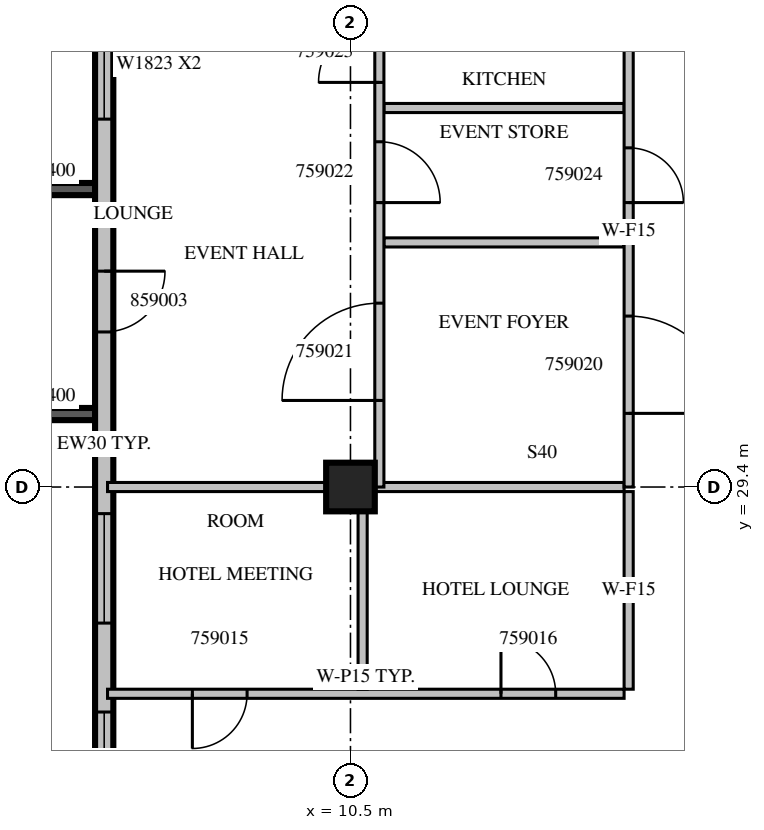
"""IFC4 building model, lengths in metres.
Left out: names, types, materials, properties, quantities, classifications, styles, units other than length and angle.
Written with IfcOpenShell. Run it as: python <this file> out.ifc"""

import sys

from ifc_helpers import new_model, si_unit, direction, frame, frame_2d, origin, origin_2d, place, context, subcontext, project, spatial, rectangle, extrude, source, transform, mapped, element, fill, save


model = new_model("IFC4")
c1 = context("Model", 3, precision=1e-05, world=origin(), true_north=direction((0.0, 1.0)))
c2 = subcontext(c1, "Body", "Model", "MODEL_VIEW")
j1 = project(units=[si_unit("LENGTHUNIT", "METRE"), si_unit("PLANEANGLEUNIT", "RADIAN")], contexts=[c1])
p1 = place(None, origin())
s1 = spatial("IfcSite", under=j1, at=p1, CompositionType="ELEMENT")
p2 = place(p1, origin())
s2 = spatial("IfcBuilding", under=s1, at=p2, CompositionType="ELEMENT")
p3 = place(p2, frame((0.0, 0.0, 257.6)))
s3 = spatial("IfcBuildingStorey", under=s2, at=p3, CompositionType="ELEMENT", Elevation=257.6)
m1 = source(origin(), c2, "Body", "SweptSolid", [
    extrude(rectangle(XDim=0.8, YDim=0.8, at=origin_2d()), origin(), (0.0, 0.0, 1.0), 3.8),
])
p4 = place(p3, frame((10.5, 29.4, 0.0), z_axis=(0.0, 0.0, 1.0), x_axis=(1.0, 0.0, 0.0)))
e1 = element("IfcColumn", 1, at=p4, inside=s3, PredefinedType="COLUMN", context=c2, shape_type="MappedRepresentation", body=[
    mapped(m1, transform((0.0, 0.0, 0.0), scale=1.0)),
])
m2 = source(origin(), c2, "Body", "SweptSolid", [
    extrude(rectangle(XDim=2.1, YDim=0.2, at=frame_2d((1.05, 0.0))), origin(), (0.0, 0.0, 1.0), 3.4),
])
for number, where, z_axis, x_axis in (
    (2, (6.3, 34.3, 0.0), (0.0, 0.0, 1.0), (-1.0, 0.0, 0.0)),
    (3, (6.3, 30.6, 0.0), (0.0, 0.0, 1.0), (-1.0, 0.0, 0.0)),
):
    element("IfcWall", number, at=place(p3, frame(where, z_axis=z_axis, x_axis=x_axis)), inside=s3, PredefinedType="SOLIDWALL", context=c2, shape_type="MappedRepresentation", body=[
        mapped(m2, transform((0.0, 0.0, 0.0), scale=1.0)),
    ])
m3 = source(origin(), c2, "Body", "SweptSolid", [
    extrude(rectangle(XDim=16.6, YDim=0.3, at=frame_2d((8.3, 0.0))), origin(), (0.0, 0.0, 1.0), 3.4),
])
p5 = place(p3, frame((6.45, 38.4, 0.0), z_axis=(0.0, 0.0, 1.0), x_axis=(0.0, -1.0, 0.0)))
e4 = element("IfcWall", 4, at=p5, inside=s3, PredefinedType="STANDARD", context=c2, shape_type="MappedRepresentation", body=[
    mapped(m3, transform((0.0, 0.0, 0.0), scale=1.0)),
])
m4 = source(origin(), c2, "Body", "SweptSolid", [
    extrude(rectangle(XDim=1.8, YDim=2.3, at=frame_2d((0.9, 1.15))), frame((0.0, 0.16, 0.0), z_axis=(0.0, -1.0, 0.0), x_axis=(1.0, 0.0, 0.0)), (0.0, 0.0, 1.0), 0.32),
])
p6 = place(p5, frame((1.15, 0.0, 0.6)))
e5 = element("IfcOpeningElement", 5, at=p6, cuts=e4, PredefinedType="OPENING", context=c2, shape_type="MappedRepresentation", body=[
    mapped(m4, transform((0.0, 0.0, 0.0), scale=1.0)),
])
p7 = place(p5, frame((9.438, 0.0, 0.6)))
e6 = element("IfcOpeningElement", 6, at=p7, cuts=e4, PredefinedType="OPENING", context=c2, shape_type="MappedRepresentation", body=[
    mapped(m4, transform((0.0, 0.0, 0.0), scale=1.0)),
])
m5 = source(origin(), c2, "Body", "SweptSolid", [
    extrude(rectangle(XDim=3.0, YDim=2.3, at=frame_2d((1.5, 1.15))), frame((0.0, 0.16, 0.0), z_axis=(0.0, -1.0, 0.0), x_axis=(1.0, 0.0, 0.0)), (0.0, 0.0, 1.0), 0.32),
])
p8 = place(p5, frame((12.7, 0.0, 0.6)))
e7 = element("IfcOpeningElement", 7, at=p8, cuts=e4, PredefinedType="OPENING", context=c2, shape_type="MappedRepresentation", body=[
    mapped(m5, transform((0.0, 0.0, 0.0), scale=1.0)),
])
m6 = source(origin(), c2, "Body", "SweptSolid", [
    extrude(rectangle(XDim=1.0, YDim=2.1, at=frame_2d((0.5, 1.05))), frame((0.0, 0.16, 0.0), z_axis=(0.0, -1.0, 0.0), x_axis=(1.0, 0.0, 0.0)), (0.0, 0.0, 1.0), 0.32),
])
p9 = place(p5, frame((5.45, 0.0, 0.0)))
e8 = element("IfcOpeningElement", 8, at=p9, cuts=e4, PredefinedType="OPENING", context=c2, shape_type="MappedRepresentation", body=[
    mapped(m6, transform((0.0, 0.0, 0.0), scale=1.0)),
])
m7 = source(origin(), c2, "Body", "SweptSolid", [
    extrude(rectangle(XDim=8.495, YDim=0.15, at=frame_2d((4.247, 0.0))), origin(), (0.0, 0.0, 1.0), 3.4),
])
p10 = place(p3, frame((6.505, 26.0, 0.0), z_axis=(0.0, 0.0, 1.0), x_axis=(1.0, 0.0, 0.0)))
e9 = element("IfcWall", 9, at=p10, inside=s3, PredefinedType="PARTITIONING", context=c2, shape_type="MappedRepresentation", body=[
    mapped(m7, transform((0.0, 0.0, 0.0), scale=1.0)),
])
m8 = source(origin(), c2, "Body", "SweptSolid", [
    extrude(rectangle(XDim=0.9, YDim=2.1, at=frame_2d((0.45, 1.05))), frame((0.0, 0.085, 0.0), z_axis=(0.0, -1.0, 0.0), x_axis=(1.0, 0.0, 0.0)), (0.0, 0.0, 1.0), 0.17),
])
p11 = place(p10, frame((1.395, 0.0, 0.0)))
e10 = element("IfcOpeningElement", 10, at=p11, cuts=e9, PredefinedType="OPENING", context=c2, shape_type="MappedRepresentation", body=[
    mapped(m8, transform((0.0, 0.0, 0.0), scale=1.0)),
])
p12 = place(p10, frame((6.47, 0.0, 0.0)))
e11 = element("IfcOpeningElement", 11, at=p12, cuts=e9, PredefinedType="OPENING", context=c2, shape_type="MappedRepresentation", body=[
    mapped(m8, transform((0.0, 0.0, 0.0), scale=1.0)),
])
p13 = place(p3, frame((10.7, 26.075, 0.0), z_axis=(0.0, 0.0, 1.0), x_axis=(0.0, 1.0, 0.0)))
e12 = element("IfcWall", 12, at=p13, inside=s3, PredefinedType="PARTITIONING", context=c2, shape_type="SweptSolid", body=[
    extrude(rectangle(XDim=2.926, YDim=0.15, at=frame_2d((1.463, 0.0))), origin(), (0.0, 0.0, 1.0), 3.4),
])
m9 = source(origin(), c2, "Body", "SweptSolid", [
    extrude(rectangle(XDim=3.25, YDim=0.15, at=frame_2d((1.625, 0.0))), origin(), (0.0, 0.0, 1.0), 3.4),
])
p14 = place(p3, frame((15.075, 26.075, 0.0), z_axis=(0.0, 0.0, 1.0), x_axis=(0.0, 1.0, 0.0)))
e13 = element("IfcWall", 13, at=p14, inside=s3, PredefinedType="PARTITIONING", context=c2, shape_type="MappedRepresentation", body=[
    mapped(m9, transform((0.0, 0.0, 0.0), scale=1.0)),
])
m10 = source(origin(), c2, "Body", "SweptSolid", [
    extrude(rectangle(XDim=3.596, YDim=0.15, at=frame_2d((1.798, 0.0))), origin(), (0.0, 0.0, 1.0), 3.4),
])
p15 = place(p3, frame((10.101, 29.4, 0.0), z_axis=(0.0, 0.0, 1.0), x_axis=(-1.0, 0.0, 0.0)))
e14 = element("IfcWall", 14, at=p15, inside=s3, PredefinedType="PARTITIONING", context=c2, shape_type="MappedRepresentation", body=[
    mapped(m10, transform((0.0, 0.0, 0.0), scale=1.0)),
])
m11 = source(origin(), c2, "Body", "SweptSolid", [
    extrude(rectangle(XDim=4.101, YDim=0.15, at=frame_2d((2.05, 0.0))), origin(), (0.0, 0.0, 1.0), 3.4),
])
p16 = place(p3, frame((15.0, 29.4, 0.0), z_axis=(0.0, 0.0, 1.0), x_axis=(-1.0, 0.0, 0.0)))
e15 = element("IfcWall", 15, at=p16, inside=s3, PredefinedType="PARTITIONING", context=c2, shape_type="MappedRepresentation", body=[
    mapped(m11, transform((0.0, 0.0, 0.0), scale=1.0)),
])
m12 = source(origin(), c2, "Body", "SweptSolid", [
    extrude(rectangle(XDim=3.95, YDim=0.15, at=frame_2d((1.975, 0.0))), origin(), (0.0, 0.0, 1.0), 3.4),
])
for number, where, z_axis, x_axis in (
    (16, (15.0, 33.422, 0.0), (0.0, 0.0, 1.0), (-1.0, 0.0, 0.0)),
    (17, (15.0, 35.633, 0.0), (0.0, 0.0, 1.0), (-1.0, 0.0, 0.0)),
):
    element("IfcWall", number, at=place(p3, frame(where, z_axis=z_axis, x_axis=x_axis)), inside=s3, PredefinedType="PARTITIONING", context=c2, shape_type="MappedRepresentation", body=[
        mapped(m12, transform((0.0, 0.0, 0.0), scale=1.0)),
    ])
m13 = source(origin(), c2, "Body", "SweptSolid", [
    extrude(rectangle(XDim=8.4, YDim=0.15, at=frame_2d((4.2, 0.0))), origin(), (0.0, 0.0, 1.0), 3.4),
])
p17 = place(p3, frame((10.975, 29.4, 0.0), z_axis=(0.0, 0.0, 1.0), x_axis=(0.0, 1.0, 0.0)))
e18 = element("IfcWall", 18, at=p17, inside=s3, PredefinedType="PARTITIONING", context=c2, shape_type="MappedRepresentation", body=[
    mapped(m13, transform((0.0, 0.0, 0.0), scale=1.0)),
])
m14 = source(origin(), c2, "Body", "SweptSolid", [
    extrude(rectangle(XDim=1.6, YDim=2.1, at=frame_2d((0.8, 1.05))), frame((0.0, 0.085, 0.0), z_axis=(0.0, -1.0, 0.0), x_axis=(1.0, 0.0, 0.0)), (0.0, 0.0, 1.0), 0.17),
])
p18 = place(p17, frame((1.424, 0.0, 0.0)))
e19 = element("IfcOpeningElement", 19, at=p18, cuts=e18, PredefinedType="OPENING", context=c2, shape_type="MappedRepresentation", body=[
    mapped(m14, transform((0.0, 0.0, 0.0), scale=1.0)),
])
m15 = source(origin(), c2, "Body", "SweptSolid", [
    extrude(rectangle(XDim=1.0, YDim=2.1, at=frame_2d((0.5, 1.05))), frame((0.0, 0.085, 0.0), z_axis=(0.0, -1.0, 0.0), x_axis=(1.0, 0.0, 0.0)), (0.0, 0.0, 1.0), 0.17),
])
p19 = place(p17, frame((4.678, 0.0, 0.0)))
e20 = element("IfcOpeningElement", 20, at=p19, cuts=e18, PredefinedType="OPENING", context=c2, shape_type="MappedRepresentation", body=[
    mapped(m15, transform((0.0, 0.0, 0.0), scale=1.0)),
])
p20 = place(p17, frame((6.654, 0.0, 0.0)))
e21 = element("IfcOpeningElement", 21, at=p20, cuts=e18, PredefinedType="OPENING", context=c2, shape_type="MappedRepresentation", body=[
    mapped(m15, transform((0.0, 0.0, 0.0), scale=1.0)),
])
p21 = place(p3, frame((15.075, 29.4, 0.0), z_axis=(0.0, 0.0, 1.0), x_axis=(0.0, 1.0, 0.0)))
e22 = element("IfcWall", 22, at=p21, inside=s3, PredefinedType="PARTITIONING", context=c2, shape_type="MappedRepresentation", body=[
    mapped(m13, transform((0.0, 0.0, 0.0), scale=1.0)),
])
p22 = place(p21, frame((1.211, 0.0, 0.0)))
e23 = element("IfcOpeningElement", 23, at=p22, cuts=e22, PredefinedType="OPENING", context=c2, shape_type="MappedRepresentation", body=[
    mapped(m14, transform((0.0, 0.0, 0.0), scale=1.0)),
])
p23 = place(p21, frame((4.678, 0.0, 0.0)))
e24 = element("IfcOpeningElement", 24, at=p23, cuts=e22, PredefinedType="OPENING", context=c2, shape_type="MappedRepresentation", body=[
    mapped(m8, transform((0.0, 0.0, 0.0), scale=1.0)),
])
m16 = source(origin(), c2, "Body", "SweptSolid", [
    extrude(rectangle(XDim=1.8, YDim=2.3, at=frame_2d((0.9, 1.15))), frame((0.0, 0.03, 0.0), z_axis=(0.0, -1.0, 0.0), x_axis=(1.0, 0.0, 0.0)), (0.0, 0.0, 1.0), 0.06),
])
p24 = place(p6, origin())
e25 = element("IfcWindow", 25, at=p24, inside=s3, PartitioningType="SINGLE_PANEL", PredefinedType="WINDOW", context=c2, shape_type="MappedRepresentation", body=[
    mapped(m16, transform((0.0, 0.0, 0.0), scale=1.0)),
])
fill(e5, e25)
p25 = place(p7, origin())
e26 = element("IfcWindow", 26, at=p25, inside=s3, PartitioningType="SINGLE_PANEL", PredefinedType="WINDOW", context=c2, shape_type="MappedRepresentation", body=[
    mapped(m16, transform((0.0, 0.0, 0.0), scale=1.0)),
])
fill(e6, e26)
m17 = source(origin(), c2, "Body", "SweptSolid", [
    extrude(rectangle(XDim=3.0, YDim=2.3, at=frame_2d((1.5, 1.15))), frame((0.0, 0.03, 0.0), z_axis=(0.0, -1.0, 0.0), x_axis=(1.0, 0.0, 0.0)), (0.0, 0.0, 1.0), 0.06),
])
p26 = place(p8, origin())
e27 = element("IfcWindow", 27, at=p26, inside=s3, PartitioningType="SINGLE_PANEL", PredefinedType="WINDOW", context=c2, shape_type="MappedRepresentation", body=[
    mapped(m17, transform((0.0, 0.0, 0.0), scale=1.0)),
])
fill(e7, e27)
m18 = source(origin(), c2, "Body", "SweptSolid", [
    extrude(rectangle(XDim=0.9, YDim=2.1, at=frame_2d((0.45, 1.05))), frame((0.0, 0.025, 0.0), z_axis=(0.0, -1.0, 0.0), x_axis=(1.0, 0.0, 0.0)), (0.0, 0.0, 1.0), 0.05),
])
p27 = place(p11, origin())
e28 = element("IfcDoor", 28, at=p27, inside=s3, OperationType="SINGLE_SWING_RIGHT", PredefinedType="DOOR", context=c2, shape_type="MappedRepresentation", body=[
    mapped(m18, transform((0.0, 0.0, 0.0), scale=1.0)),
])
fill(e10, e28)
p28 = place(p12, origin())
e29 = element("IfcDoor", 29, at=p28, inside=s3, OperationType="SINGLE_SWING_LEFT", PredefinedType="DOOR", context=c2, shape_type="MappedRepresentation", body=[
    mapped(m18, transform((0.0, 0.0, 0.0), scale=1.0)),
])
fill(e11, e29)
m19 = source(origin(), c2, "Body", "SweptSolid", [
    extrude(rectangle(XDim=1.6, YDim=2.1, at=frame_2d((0.8, 1.05))), frame((0.0, 0.025, 0.0), z_axis=(0.0, -1.0, 0.0), x_axis=(1.0, 0.0, 0.0)), (0.0, 0.0, 1.0), 0.05),
])
p29 = place(p22, origin())
e30 = element("IfcDoor", 30, at=p29, inside=s3, OperationType="SINGLE_SWING_RIGHT", PredefinedType="DOOR", context=c2, shape_type="MappedRepresentation", body=[
    mapped(m19, transform((0.0, 0.0, 0.0), scale=1.0)),
])
fill(e23, e30)
p30 = place(p18, origin())
e31 = element("IfcDoor", 31, at=p30, inside=s3, OperationType="SINGLE_SWING_LEFT", PredefinedType="DOOR", context=c2, shape_type="MappedRepresentation", body=[
    mapped(m19, transform((0.0, 0.0, 0.0), scale=1.0)),
])
fill(e19, e31)
m20 = source(origin(), c2, "Body", "SweptSolid", [
    extrude(rectangle(XDim=1.0, YDim=2.1, at=frame_2d((0.5, 1.05))), frame((0.0, 0.025, 0.0), z_axis=(0.0, -1.0, 0.0), x_axis=(1.0, 0.0, 0.0)), (0.0, 0.0, 1.0), 0.05),
])
p31 = place(p19, origin())
e32 = element("IfcDoor", 32, at=p31, inside=s3, OperationType="SINGLE_SWING_RIGHT", PredefinedType="DOOR", context=c2, shape_type="MappedRepresentation", body=[
    mapped(m20, transform((0.0, 0.0, 0.0), scale=1.0)),
])
fill(e20, e32)
p32 = place(p20, origin())
e33 = element("IfcDoor", 33, at=p32, inside=s3, OperationType="SINGLE_SWING_LEFT", PredefinedType="DOOR", context=c2, shape_type="MappedRepresentation", body=[
    mapped(m20, transform((0.0, 0.0, 0.0), scale=1.0)),
])
fill(e21, e33)
p33 = place(p23, origin())
e34 = element("IfcDoor", 34, at=p33, inside=s3, OperationType="SINGLE_SWING_RIGHT", PredefinedType="DOOR", context=c2, shape_type="MappedRepresentation", body=[
    mapped(m18, transform((0.0, 0.0, 0.0), scale=1.0)),
])
fill(e24, e34)
p34 = place(p9, origin())
e35 = element("IfcDoor", 35, at=p34, inside=s3, OperationType="SINGLE_SWING_LEFT", PredefinedType="DOOR", context=c2, shape_type="MappedRepresentation", body=[
    mapped(m20, transform((0.0, 0.0, 0.0), scale=1.0)),
])
fill(e8, e35)
save(model, sys.argv[1])
